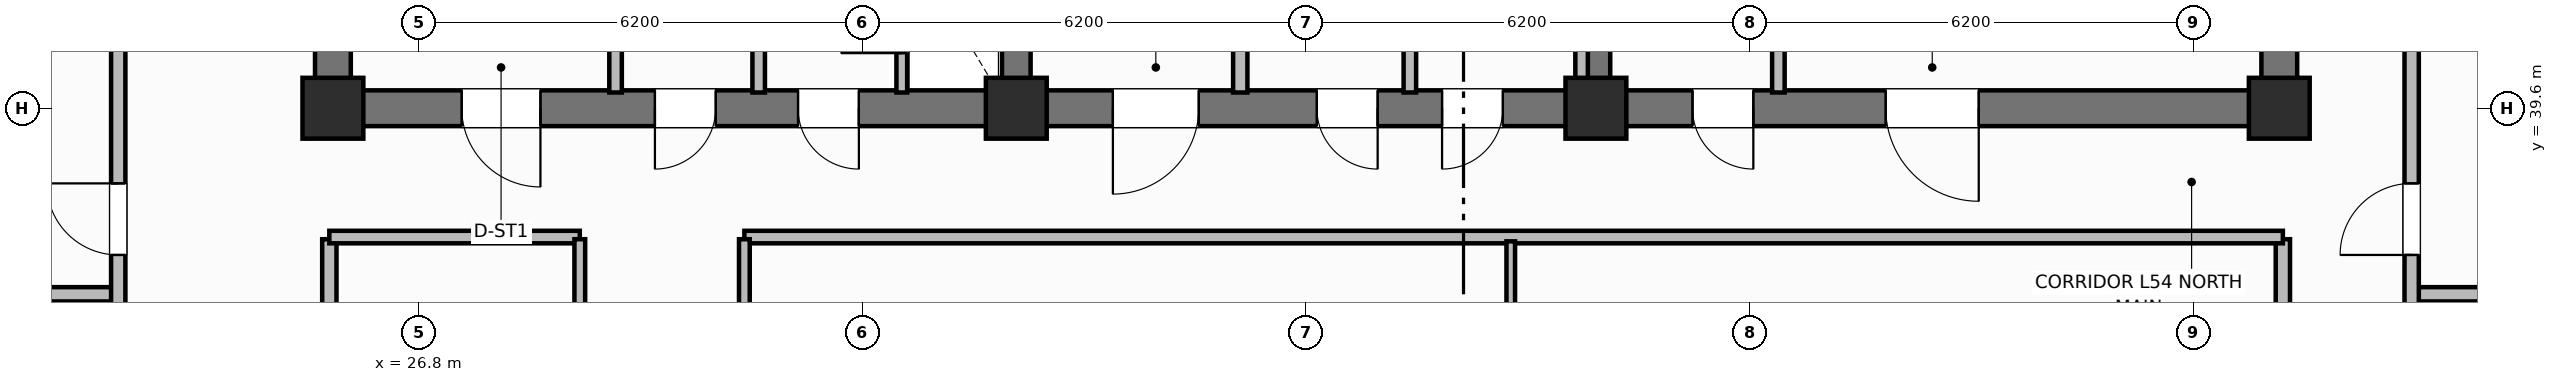
"""IFC4 building model, lengths in metres.
Left out: names, types, materials, properties, quantities, classifications, styles, units other than length and angle.
Written with IfcOpenShell. Run it as: python <this file> out.ifc"""

import sys

from ifc_helpers import new_model, si_unit, direction, frame, frame_2d, origin, origin_2d, place, context, subcontext, project, spatial, rectangle, extrude, element, fill, save


model = new_model("IFC4")
c1 = context("Model", 3, precision=1e-05, world=origin(), true_north=direction((0.0, 1.0)))
c2 = subcontext(c1, "Body", "Model", "MODEL_VIEW")
j1 = project(units=[si_unit("LENGTHUNIT", "METRE"), si_unit("PLANEANGLEUNIT", "RADIAN")], contexts=[c1])
p1 = place(None, origin())
s1 = spatial("IfcSite", under=j1, at=p1, CompositionType="ELEMENT")
p2 = place(p1, origin())
s2 = spatial("IfcBuilding", under=s1, at=p2, CompositionType="ELEMENT")
p3 = place(p2, frame((0.0, 0.0, 218.4)))
s3 = spatial("IfcBuildingStorey", under=s2, at=p3, CompositionType="ELEMENT", Elevation=218.4)
for number, where, z_axis, x_axis in (
    (1, (25.6, 39.85, 0.0), (0.0, 0.0, 1.0), (0.0, 1.0, 0.0)),
    (2, (52.8, 39.85, 0.0), (0.0, 0.0, 1.0), (0.0, 1.0, 0.0)),
):
    element("IfcWall", number, at=place(p3, frame(where, z_axis=z_axis, x_axis=x_axis)), inside=s3, PredefinedType="SHEAR", context=c2, shape_type="SweptSolid", body=[
        extrude(rectangle(XDim=5.7, YDim=0.5, at=frame_2d((2.85, 0.0))), origin(), (0.0, 0.0, 1.0), 3.7),
    ])
p4 = place(p3, frame((52.8, 39.6, 0.0), z_axis=(0.0, 0.0, 1.0), x_axis=(-1.0, 0.0, 0.0)))
e3 = element("IfcWall", 3, at=p4, inside=s3, PredefinedType="SHEAR", context=c2, shape_type="SweptSolid", body=[
    extrude(rectangle(XDim=27.2, YDim=0.5, at=frame_2d((13.6, 0.0))), origin(), (0.0, 0.0, 1.0), 3.7),
])
p5 = place(p4, frame((24.3, 0.0, 0.0)))
e4 = element("IfcOpeningElement", 4, at=p5, cuts=e3, PredefinedType="OPENING", context=c2, shape_type="SweptSolid", body=[
    extrude(rectangle(XDim=1.1, YDim=2.15, at=frame_2d((0.55, 1.075))), frame((0.0, 0.26, 0.0), z_axis=(0.0, -1.0, 0.0), x_axis=(1.0, 0.0, 0.0)), (0.0, 0.0, 1.0), 0.52),
])
p6 = place(p4, frame((21.85, 0.0, 0.0)))
e5 = element("IfcOpeningElement", 5, at=p6, cuts=e3, PredefinedType="OPENING", context=c2, shape_type="SweptSolid", body=[
    extrude(rectangle(XDim=0.85, YDim=2.1, at=frame_2d((0.425, 1.05))), frame((0.0, 0.26, 0.0), z_axis=(0.0, -1.0, 0.0), x_axis=(1.0, 0.0, 0.0)), (0.0, 0.0, 1.0), 0.52),
])
p7 = place(p4, frame((19.85, 0.0, 0.0)))
e6 = element("IfcOpeningElement", 6, at=p7, cuts=e3, PredefinedType="OPENING", context=c2, shape_type="SweptSolid", body=[
    extrude(rectangle(XDim=0.85, YDim=2.1, at=frame_2d((0.425, 1.05))), frame((0.0, 0.26, 0.0), z_axis=(0.0, -1.0, 0.0), x_axis=(1.0, 0.0, 0.0)), (0.0, 0.0, 1.0), 0.52),
])
p8 = place(p4, frame((15.1, 0.0, 0.0)))
e7 = element("IfcOpeningElement", 7, at=p8, cuts=e3, PredefinedType="OPENING", context=c2, shape_type="SweptSolid", body=[
    extrude(rectangle(XDim=1.2, YDim=2.15, at=frame_2d((0.6, 1.075))), frame((0.0, 0.26, 0.0), z_axis=(0.0, -1.0, 0.0), x_axis=(1.0, 0.0, 0.0)), (0.0, 0.0, 1.0), 0.52),
])
p9 = place(p4, frame((12.6, 0.0, 0.0)))
e8 = element("IfcOpeningElement", 8, at=p9, cuts=e3, PredefinedType="OPENING", context=c2, shape_type="SweptSolid", body=[
    extrude(rectangle(XDim=0.85, YDim=2.1, at=frame_2d((0.425, 1.05))), frame((0.0, 0.26, 0.0), z_axis=(0.0, -1.0, 0.0), x_axis=(1.0, 0.0, 0.0)), (0.0, 0.0, 1.0), 0.52),
])
p10 = place(p4, frame((10.85, 0.0, 0.0)))
e9 = element("IfcOpeningElement", 9, at=p10, cuts=e3, PredefinedType="OPENING", context=c2, shape_type="SweptSolid", body=[
    extrude(rectangle(XDim=0.85, YDim=2.1, at=frame_2d((0.425, 1.05))), frame((0.0, 0.26, 0.0), z_axis=(0.0, -1.0, 0.0), x_axis=(1.0, 0.0, 0.0)), (0.0, 0.0, 1.0), 0.52),
])
p11 = place(p4, frame((7.35, 0.0, 0.0)))
e10 = element("IfcOpeningElement", 10, at=p11, cuts=e3, PredefinedType="OPENING", context=c2, shape_type="SweptSolid", body=[
    extrude(rectangle(XDim=0.85, YDim=2.1, at=frame_2d((0.425, 1.05))), frame((0.0, 0.26, 0.0), z_axis=(0.0, -1.0, 0.0), x_axis=(1.0, 0.0, 0.0)), (0.0, 0.0, 1.0), 0.52),
])
p12 = place(p4, frame((4.2, 0.0, 0.0)))
e11 = element("IfcOpeningElement", 11, at=p12, cuts=e3, PredefinedType="OPENING", context=c2, shape_type="SweptSolid", body=[
    extrude(rectangle(XDim=1.3, YDim=2.2, at=frame_2d((0.65, 1.1))), frame((0.0, 0.26, 0.0), z_axis=(0.0, -1.0, 0.0), x_axis=(1.0, 0.0, 0.0)), (0.0, 0.0, 1.0), 0.52),
])
for number, where, z_axis, x_axis in (
    (12, (35.15, 39.85, 0.0), (0.0, 0.0, 1.0), (0.0, 1.0, 0.0)),
    (13, (43.25, 39.85, 0.0), (0.0, 0.0, 1.0), (0.0, 1.0, 0.0)),
):
    element("IfcWall", number, at=place(p3, frame(where, z_axis=z_axis, x_axis=x_axis)), inside=s3, PredefinedType="SHEAR", context=c2, shape_type="SweptSolid", body=[
        extrude(rectangle(XDim=5.7, YDim=0.4, at=frame_2d((2.85, 0.0))), origin(), (0.0, 0.0, 1.0), 3.7),
    ])
for number, where, z_axis, x_axis in (
    (14, (25.6, 39.6, 0.0), (0.0, 0.0, 1.0), (1.0, 0.0, 0.0)),
    (15, (35.15, 39.6, 0.0), (0.0, 0.0, 1.0), (1.0, 0.0, 0.0)),
    (16, (43.25, 39.6, 0.0), (0.0, 0.0, 1.0), (1.0, 0.0, 0.0)),
    (17, (52.8, 39.6, 0.0), (0.0, 0.0, 1.0), (1.0, 0.0, 0.0)),
):
    element("IfcColumn", number, at=place(p3, frame(where, z_axis=z_axis, x_axis=x_axis)), inside=s3, PredefinedType="COLUMN", context=c2, shape_type="SweptSolid", body=[
        extrude(rectangle(XDim=0.85, YDim=0.85, at=origin_2d()), origin(), (0.0, 0.0, 1.0), 3.7),
    ])
p13 = place(p3, frame((33.55, 39.82, 0.0), z_axis=(0.0, 0.0, 1.0), x_axis=(0.0, 1.0, 0.0)))
e18 = element("IfcWall", 18, at=p13, inside=s3, PredefinedType="PARTITIONING", context=c2, shape_type="SweptSolid", body=[
    extrude(rectangle(XDim=2.13, YDim=0.15, at=frame_2d((1.065, 0.0))), origin(), (0.0, 0.0, 1.0), 2.55),
])
p14 = place(p13, frame((0.55, 0.0, 0.0)))
e19 = element("IfcOpeningElement", 19, at=p14, cuts=e18, PredefinedType="OPENING", context=c2, shape_type="SweptSolid", body=[
    extrude(rectangle(XDim=0.85, YDim=2.05, at=frame_2d((0.425, 1.025))), frame((0.0, 0.085, 0.0), z_axis=(0.0, -1.0, 0.0), x_axis=(1.0, 0.0, 0.0)), (0.0, 0.0, 1.0), 0.17),
])
for number, where, z_axis, x_axis in (
    (20, (29.55, 39.82, 0.0), (0.0, 0.0, 1.0), (0.0, 1.0, 0.0)),
    (21, (31.55, 39.82, 0.0), (0.0, 0.0, 1.0), (0.0, 1.0, 0.0)),
):
    element("IfcWall", number, at=place(p3, frame(where, z_axis=z_axis, x_axis=x_axis)), inside=s3, PredefinedType="PARTITIONING", context=c2, shape_type="SweptSolid", body=[
        extrude(rectangle(XDim=2.13, YDim=0.175, at=frame_2d((1.065, 0.0))), origin(), (0.0, 0.0, 1.0), 2.55),
    ])
p15 = place(p3, frame((38.28, 39.82, 0.0), z_axis=(0.0, 0.0, 1.0), x_axis=(0.0, 1.0, 0.0)))
e22 = element("IfcWall", 22, at=p15, inside=s3, PredefinedType="PARTITIONING", context=c2, shape_type="SweptSolid", body=[
    extrude(rectangle(XDim=5.63, YDim=0.2, at=frame_2d((2.815, 0.0))), origin(), (0.0, 0.0, 1.0), 2.55),
])
for number, where, z_axis, x_axis in (
    (23, (43.05, 39.82, 0.0), (0.0, 0.0, 1.0), (0.0, 1.0, 0.0)),
    (24, (40.65, 39.82, 0.0), (0.0, 0.0, 1.0), (0.0, 1.0, 0.0)),
    (25, (45.8, 39.82, 0.0), (0.0, 0.0, 1.0), (0.0, 1.0, 0.0)),
):
    element("IfcWall", number, at=place(p3, frame(where, z_axis=z_axis, x_axis=x_axis)), inside=s3, PredefinedType="PARTITIONING", context=c2, shape_type="SweptSolid", body=[
        extrude(rectangle(XDim=5.63, YDim=0.175, at=frame_2d((2.815, 0.0))), origin(), (0.0, 0.0, 1.0), 2.55),
    ])
for number, where, z_axis, x_axis in (
    (26, (25.55, 18.63, 0.0), (0.0, 0.0, 1.0), (0.0, 1.0, 0.0)),
    (27, (52.85, 18.63, 0.0), (0.0, 0.0, 1.0), (0.0, 1.0, 0.0)),
):
    element("IfcWall", number, at=place(p3, frame(where, z_axis=z_axis, x_axis=x_axis)), inside=s3, PredefinedType="PARTITIONING", context=c2, shape_type="SweptSolid", body=[
        extrude(rectangle(XDim=19.14, YDim=0.2, at=frame_2d((9.57, 0.0))), origin(), (0.0, 0.0, 1.0), 2.55),
    ])
p16 = place(p3, frame((25.55, 37.8, 0.0), z_axis=(0.0, 0.0, 1.0), x_axis=(1.0, 0.0, 0.0)))
e28 = element("IfcWall", 28, at=p16, inside=s3, PredefinedType="PARTITIONING", context=c2, shape_type="SweptSolid", body=[
    extrude(rectangle(XDim=3.5, YDim=0.175, at=frame_2d((1.75, 0.0))), origin(), (0.0, 0.0, 1.0), 2.55),
])
p17 = place(p3, frame((31.35, 37.8, 0.0), z_axis=(0.0, 0.0, 1.0), x_axis=(1.0, 0.0, 0.0)))
e29 = element("IfcWall", 29, at=p17, inside=s3, PredefinedType="PARTITIONING", context=c2, shape_type="SweptSolid", body=[
    extrude(rectangle(XDim=21.5, YDim=0.175, at=frame_2d((10.75, 0.0))), origin(), (0.0, 0.0, 1.0), 2.55),
])
p18 = place(p3, frame((42.06, 29.388, 0.0), z_axis=(0.0, 0.0, 1.0), x_axis=(0.0, 1.0, 0.0)))
e30 = element("IfcWall", 30, at=p18, inside=s3, PredefinedType="PARTITIONING", context=c2, shape_type="SweptSolid", body=[
    extrude(rectangle(XDim=8.352, YDim=0.12, at=frame_2d((4.176, 0.0))), origin(), (0.0, 0.0, 1.0), 2.55),
])
p19 = place(p18, frame((2.0, 0.0, 0.0)))
e31 = element("IfcOpeningElement", 31, at=p19, cuts=e30, PredefinedType="OPENING", context=c2, shape_type="SweptSolid", body=[
    extrude(rectangle(XDim=0.9, YDim=2.1, at=frame_2d((0.45, 1.05))), frame((0.0, 0.07, 0.0), z_axis=(0.0, -1.0, 0.0), x_axis=(1.0, 0.0, 0.0)), (0.0, 0.0, 1.0), 0.14),
])
p20 = place(p3, frame((29.05, 18.63, 0.0), z_axis=(0.0, 0.0, 1.0), x_axis=(0.0, 1.0, 0.0)))
e32 = element("IfcWall", 32, at=p20, inside=s3, PredefinedType="PARTITIONING", context=c2, shape_type="SweptSolid", body=[
    extrude(rectangle(XDim=19.14, YDim=0.15, at=frame_2d((9.57, 0.0))), origin(), (0.0, 0.0, 1.0), 2.55),
])
p21 = place(p20, frame((5.5, 0.0, 0.0)))
e33 = element("IfcOpeningElement", 33, at=p21, cuts=e32, PredefinedType="OPENING", context=c2, shape_type="SweptSolid", body=[
    extrude(rectangle(XDim=1.0, YDim=2.15, at=frame_2d((0.5, 1.075))), frame((0.0, 0.085, 0.0), z_axis=(0.0, -1.0, 0.0), x_axis=(1.0, 0.0, 0.0)), (0.0, 0.0, 1.0), 0.17),
])
p22 = place(p3, frame((31.35, 18.63, 0.0), z_axis=(0.0, 0.0, 1.0), x_axis=(0.0, 1.0, 0.0)))
e34 = element("IfcWall", 34, at=p22, inside=s3, PredefinedType="PARTITIONING", context=c2, shape_type="SweptSolid", body=[
    extrude(rectangle(XDim=19.14, YDim=0.15, at=frame_2d((9.57, 0.0))), origin(), (0.0, 0.0, 1.0), 2.55),
])
p23 = place(p22, frame((2.2, 0.0, 0.0)))
e35 = element("IfcOpeningElement", 35, at=p23, cuts=e34, PredefinedType="OPENING", context=c2, shape_type="SweptSolid", body=[
    extrude(rectangle(XDim=1.0, YDim=2.15, at=frame_2d((0.5, 1.075))), frame((0.0, 0.085, 0.0), z_axis=(0.0, -1.0, 0.0), x_axis=(1.0, 0.0, 0.0)), (0.0, 0.0, 1.0), 0.17),
])
p24 = place(p22, frame((12.719, 0.0, 0.0)))
e36 = element("IfcOpeningElement", 36, at=p24, cuts=e34, PredefinedType="OPENING", context=c2, shape_type="SweptSolid", body=[
    extrude(rectangle(XDim=1.0, YDim=2.15, at=frame_2d((0.5, 1.075))), frame((0.0, 0.085, 0.0), z_axis=(0.0, -1.0, 0.0), x_axis=(1.0, 0.0, 0.0)), (0.0, 0.0, 1.0), 0.17),
])
p25 = place(p3, frame((16.57, 37.0, 0.0), z_axis=(0.0, 0.0, 1.0), x_axis=(1.0, 0.0, 0.0)))
e37 = element("IfcWall", 37, at=p25, inside=s3, PredefinedType="PARTITIONING", context=c2, shape_type="SweptSolid", body=[
    extrude(rectangle(XDim=6.03, YDim=0.2, at=frame_2d((3.015, 0.0))), origin(), (0.0, 0.0, 1.0), 2.55),
])
p26 = place(p3, frame((22.6, 10.6, 0.0), z_axis=(0.0, 0.0, 1.0), x_axis=(0.0, 1.0, 0.0)))
e38 = element("IfcWall", 38, at=p26, inside=s3, PredefinedType="PARTITIONING", context=c2, shape_type="SweptSolid", body=[
    extrude(rectangle(XDim=35.2, YDim=0.2, at=frame_2d((17.6, 0.0))), origin(), (0.0, 0.0, 1.0), 2.55),
])
p27 = place(p26, frame((2.65, 0.0, 0.0)))
e39 = element("IfcOpeningElement", 39, at=p27, cuts=e38, PredefinedType="OPENING", context=c2, shape_type="SweptSolid", body=[
    extrude(rectangle(XDim=1.0, YDim=2.15, at=frame_2d((0.5, 1.075))), frame((0.0, 0.11, 0.0), z_axis=(0.0, -1.0, 0.0), x_axis=(1.0, 0.0, 0.0)), (0.0, 0.0, 1.0), 0.22),
])
p28 = place(p26, frame((10.81, 0.0, 0.0)))
e40 = element("IfcOpeningElement", 40, at=p28, cuts=e38, PredefinedType="OPENING", context=c2, shape_type="SweptSolid", body=[
    extrude(rectangle(XDim=1.0, YDim=2.15, at=frame_2d((0.5, 1.075))), frame((0.0, 0.11, 0.0), z_axis=(0.0, -1.0, 0.0), x_axis=(1.0, 0.0, 0.0)), (0.0, 0.0, 1.0), 0.22),
])
p29 = place(p26, frame((19.54, 0.0, 0.0)))
e41 = element("IfcOpeningElement", 41, at=p29, cuts=e38, PredefinedType="OPENING", context=c2, shape_type="SweptSolid", body=[
    extrude(rectangle(XDim=1.0, YDim=2.15, at=frame_2d((0.5, 1.075))), frame((0.0, 0.11, 0.0), z_axis=(0.0, -1.0, 0.0), x_axis=(1.0, 0.0, 0.0)), (0.0, 0.0, 1.0), 0.22),
])
p30 = place(p26, frame((26.95, 0.0, 0.0)))
e42 = element("IfcOpeningElement", 42, at=p30, cuts=e38, PredefinedType="OPENING", context=c2, shape_type="SweptSolid", body=[
    extrude(rectangle(XDim=1.0, YDim=2.15, at=frame_2d((0.5, 1.075))), frame((0.0, 0.11, 0.0), z_axis=(0.0, -1.0, 0.0), x_axis=(1.0, 0.0, 0.0)), (0.0, 0.0, 1.0), 0.22),
])
p31 = place(p3, frame((54.65, 37.0, 0.0), z_axis=(0.0, 0.0, 1.0), x_axis=(1.0, 0.0, 0.0)))
e43 = element("IfcWall", 43, at=p31, inside=s3, PredefinedType="PARTITIONING", context=c2, shape_type="SweptSolid", body=[
    extrude(rectangle(XDim=7.18, YDim=0.2, at=frame_2d((3.59, 0.0))), origin(), (0.0, 0.0, 1.0), 2.55),
])
p32 = place(p3, frame((54.65, 10.6, 0.0), z_axis=(0.0, 0.0, 1.0), x_axis=(0.0, 1.0, 0.0)))
e44 = element("IfcWall", 44, at=p32, inside=s3, PredefinedType="PARTITIONING", context=c2, shape_type="SweptSolid", body=[
    extrude(rectangle(XDim=35.2, YDim=0.2, at=frame_2d((17.6, 0.0))), origin(), (0.0, 0.0, 1.0), 2.55),
])
p33 = place(p32, frame((2.65, 0.0, 0.0)))
e45 = element("IfcOpeningElement", 45, at=p33, cuts=e44, PredefinedType="OPENING", context=c2, shape_type="SweptSolid", body=[
    extrude(rectangle(XDim=1.0, YDim=2.15, at=frame_2d((0.5, 1.075))), frame((0.0, 0.11, 0.0), z_axis=(0.0, -1.0, 0.0), x_axis=(1.0, 0.0, 0.0)), (0.0, 0.0, 1.0), 0.22),
])
p34 = place(p32, frame((10.81, 0.0, 0.0)))
e46 = element("IfcOpeningElement", 46, at=p34, cuts=e44, PredefinedType="OPENING", context=c2, shape_type="SweptSolid", body=[
    extrude(rectangle(XDim=1.0, YDim=2.15, at=frame_2d((0.5, 1.075))), frame((0.0, 0.11, 0.0), z_axis=(0.0, -1.0, 0.0), x_axis=(1.0, 0.0, 0.0)), (0.0, 0.0, 1.0), 0.22),
])
p35 = place(p32, frame((19.54, 0.0, 0.0)))
e47 = element("IfcOpeningElement", 47, at=p35, cuts=e44, PredefinedType="OPENING", context=c2, shape_type="SweptSolid", body=[
    extrude(rectangle(XDim=1.0, YDim=2.15, at=frame_2d((0.5, 1.075))), frame((0.0, 0.11, 0.0), z_axis=(0.0, -1.0, 0.0), x_axis=(1.0, 0.0, 0.0)), (0.0, 0.0, 1.0), 0.22),
])
p36 = place(p32, frame((26.95, 0.0, 0.0)))
e48 = element("IfcOpeningElement", 48, at=p36, cuts=e44, PredefinedType="OPENING", context=c2, shape_type="SweptSolid", body=[
    extrude(rectangle(XDim=1.0, YDim=2.15, at=frame_2d((0.5, 1.075))), frame((0.0, 0.11, 0.0), z_axis=(0.0, -1.0, 0.0), x_axis=(1.0, 0.0, 0.0)), (0.0, 0.0, 1.0), 0.22),
])
p37 = place(p14, origin())
e49 = element("IfcDoor", 49, at=p37, inside=s3, OperationType="SINGLE_SWING_LEFT", PredefinedType="TRAPDOOR", context=c2, shape_type="SweptSolid", body=[
    extrude(rectangle(XDim=0.85, YDim=2.05, at=frame_2d((0.425, 1.025))), frame((0.0, 0.025, 0.0), z_axis=(0.0, -1.0, 0.0), x_axis=(1.0, 0.0, 0.0)), (0.0, 0.0, 1.0), 0.05),
])
fill(e19, e49)
p38 = place(p30, origin())
e50 = element("IfcDoor", 50, at=p38, inside=s3, OperationType="SINGLE_SWING_RIGHT", PredefinedType="DOOR", context=c2, shape_type="SweptSolid", body=[
    extrude(rectangle(XDim=1.0, YDim=2.15, at=frame_2d((0.5, 1.075))), frame((0.0, 0.025, 0.0), z_axis=(0.0, -1.0, 0.0), x_axis=(1.0, 0.0, 0.0)), (0.0, 0.0, 1.0), 0.05),
])
fill(e42, e50)
p39 = place(p36, origin())
e51 = element("IfcDoor", 51, at=p39, inside=s3, OperationType="SINGLE_SWING_LEFT", PredefinedType="DOOR", context=c2, shape_type="SweptSolid", body=[
    extrude(rectangle(XDim=1.0, YDim=2.15, at=frame_2d((0.5, 1.075))), frame((0.0, 0.025, 0.0), z_axis=(0.0, -1.0, 0.0), x_axis=(1.0, 0.0, 0.0)), (0.0, 0.0, 1.0), 0.05),
])
fill(e48, e51)
p40 = place(p5, origin())
e52 = element("IfcDoor", 52, at=p40, inside=s3, OperationType="SINGLE_SWING_LEFT", PredefinedType="DOOR", context=c2, shape_type="SweptSolid", body=[
    extrude(rectangle(XDim=1.1, YDim=2.15, at=frame_2d((0.55, 1.075))), frame((0.0, 0.025, 0.0), z_axis=(0.0, -1.0, 0.0), x_axis=(1.0, 0.0, 0.0)), (0.0, 0.0, 1.0), 0.05),
])
fill(e4, e52)
p41 = place(p6, origin())
e53 = element("IfcDoor", 53, at=p41, inside=s3, OperationType="SINGLE_SWING_RIGHT", PredefinedType="DOOR", context=c2, shape_type="SweptSolid", body=[
    extrude(rectangle(XDim=0.85, YDim=2.1, at=frame_2d((0.425, 1.05))), frame((0.0, 0.025, 0.0), z_axis=(0.0, -1.0, 0.0), x_axis=(1.0, 0.0, 0.0)), (0.0, 0.0, 1.0), 0.05),
])
fill(e5, e53)
p42 = place(p7, origin())
e54 = element("IfcDoor", 54, at=p42, inside=s3, OperationType="SINGLE_SWING_LEFT", PredefinedType="DOOR", context=c2, shape_type="SweptSolid", body=[
    extrude(rectangle(XDim=0.85, YDim=2.1, at=frame_2d((0.425, 1.05))), frame((0.0, 0.025, 0.0), z_axis=(0.0, -1.0, 0.0), x_axis=(1.0, 0.0, 0.0)), (0.0, 0.0, 1.0), 0.05),
])
fill(e6, e54)
p43 = place(p8, origin())
e55 = element("IfcDoor", 55, at=p43, inside=s3, OperationType="SINGLE_SWING_RIGHT", PredefinedType="DOOR", context=c2, shape_type="SweptSolid", body=[
    extrude(rectangle(XDim=1.2, YDim=2.15, at=frame_2d((0.6, 1.075))), frame((0.0, 0.025, 0.0), z_axis=(0.0, -1.0, 0.0), x_axis=(1.0, 0.0, 0.0)), (0.0, 0.0, 1.0), 0.05),
])
fill(e7, e55)
p44 = place(p9, origin())
e56 = element("IfcDoor", 56, at=p44, inside=s3, OperationType="SINGLE_SWING_LEFT", PredefinedType="DOOR", context=c2, shape_type="SweptSolid", body=[
    extrude(rectangle(XDim=0.85, YDim=2.1, at=frame_2d((0.425, 1.05))), frame((0.0, 0.025, 0.0), z_axis=(0.0, -1.0, 0.0), x_axis=(1.0, 0.0, 0.0)), (0.0, 0.0, 1.0), 0.05),
])
fill(e8, e56)
p45 = place(p10, origin())
e57 = element("IfcDoor", 57, at=p45, inside=s3, OperationType="SINGLE_SWING_RIGHT", PredefinedType="DOOR", context=c2, shape_type="SweptSolid", body=[
    extrude(rectangle(XDim=0.85, YDim=2.1, at=frame_2d((0.425, 1.05))), frame((0.0, 0.025, 0.0), z_axis=(0.0, -1.0, 0.0), x_axis=(1.0, 0.0, 0.0)), (0.0, 0.0, 1.0), 0.05),
])
fill(e9, e57)
p46 = place(p11, origin())
e58 = element("IfcDoor", 58, at=p46, inside=s3, OperationType="SINGLE_SWING_LEFT", PredefinedType="DOOR", context=c2, shape_type="SweptSolid", body=[
    extrude(rectangle(XDim=0.85, YDim=2.1, at=frame_2d((0.425, 1.05))), frame((0.0, 0.025, 0.0), z_axis=(0.0, -1.0, 0.0), x_axis=(1.0, 0.0, 0.0)), (0.0, 0.0, 1.0), 0.05),
])
fill(e10, e58)
p47 = place(p12, origin())
e59 = element("IfcDoor", 59, at=p47, inside=s3, OperationType="SINGLE_SWING_LEFT", PredefinedType="DOOR", context=c2, shape_type="SweptSolid", body=[
    extrude(rectangle(XDim=1.3, YDim=2.2, at=frame_2d((0.65, 1.1))), frame((0.0, 0.025, 0.0), z_axis=(0.0, -1.0, 0.0), x_axis=(1.0, 0.0, 0.0)), (0.0, 0.0, 1.0), 0.05),
])
fill(e11, e59)
save(model, sys.argv[1])
